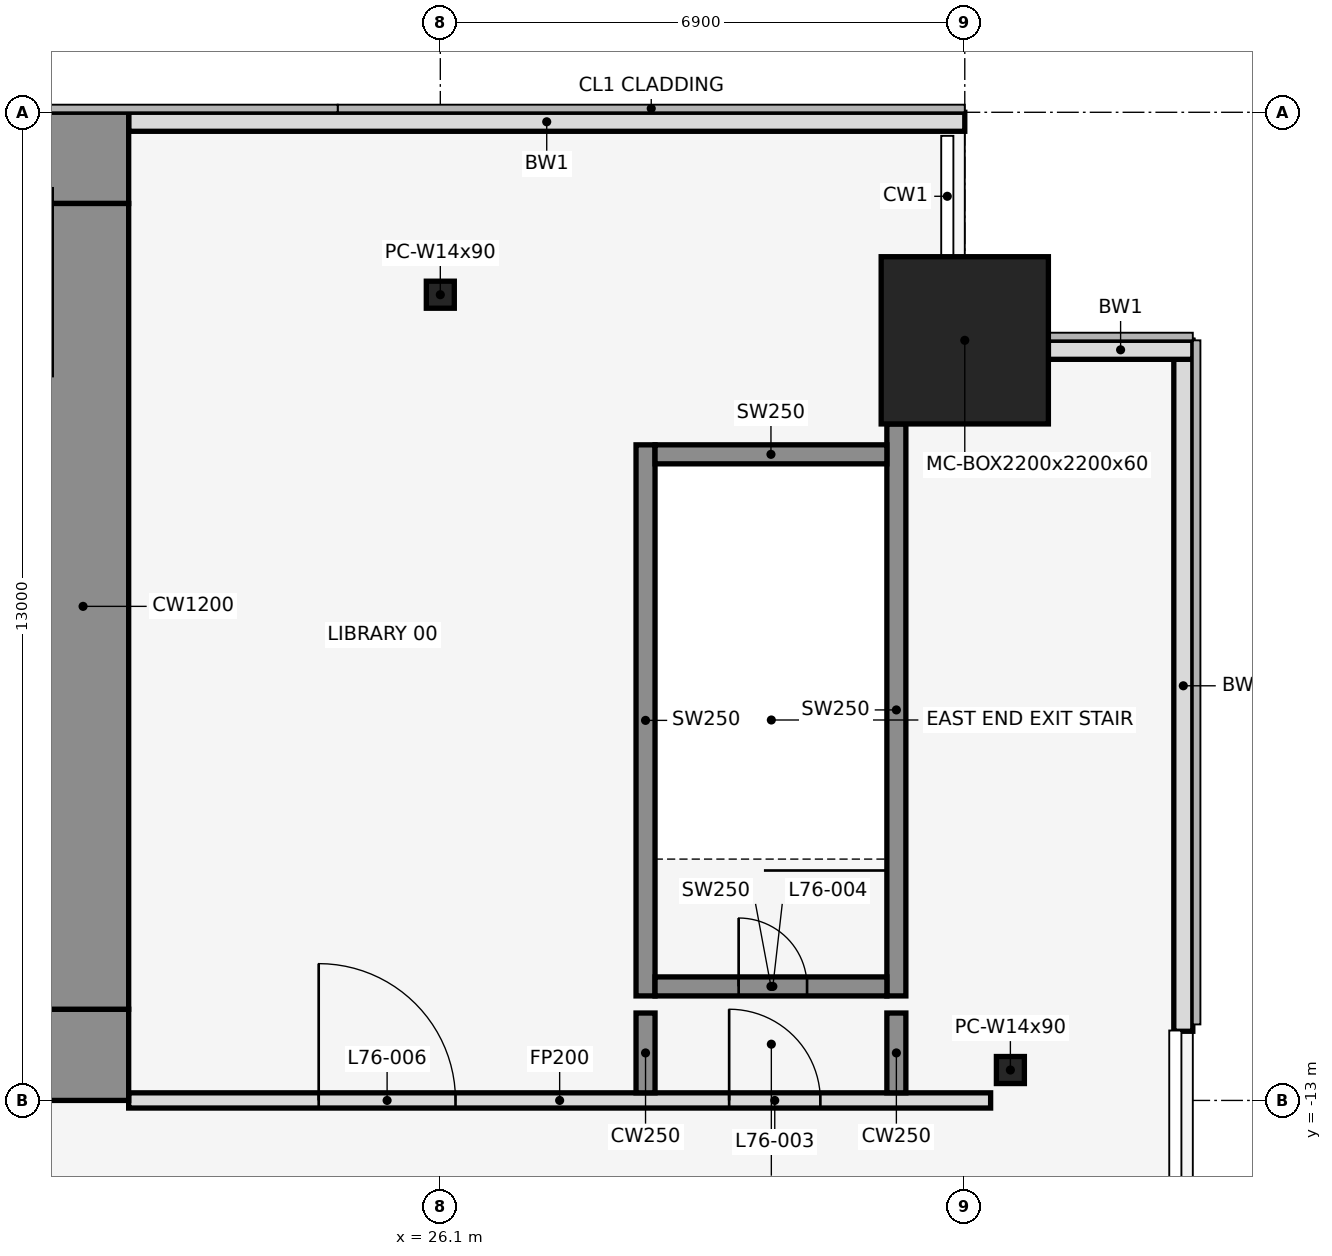
"""IFC4 building model, lengths in metres.
Left out: names, types, materials, properties, quantities, classifications, styles, units other than length and angle.
Written with IfcOpenShell. Run it as: python <this file> out.ifc"""

import sys

from ifc_helpers import new_model, si_unit, direction, frame, frame_2d, origin, origin_2d, place, context, subcontext, project, spatial, rectangle, hollow_rectangle, i_section, extrude, element, fill, save


model = new_model("IFC4")
c1 = context("Model", 3, precision=1e-05, world=origin(), true_north=direction((0.0, 1.0)))
c2 = subcontext(c1, "Body", "Model", "MODEL_VIEW")
j1 = project(units=[si_unit("LENGTHUNIT", "METRE"), si_unit("PLANEANGLEUNIT", "RADIAN")], contexts=[c1])
p1 = place(None, origin())
s1 = spatial("IfcSite", under=j1, at=p1, CompositionType="ELEMENT")
p2 = place(p1, origin())
s2 = spatial("IfcBuilding", under=s1, at=p2, CompositionType="ELEMENT")
p3 = place(p2, frame((0.0, 0.0, 338.0)))
s3 = spatial("IfcBuildingStorey", under=s2, at=p3, CompositionType="ELEMENT", Elevation=338.0)
p4 = place(p3, frame((26.1, -2.4, 0.0), z_axis=(0.0, 0.0, 1.0), x_axis=(1.0, 0.0, 0.0)))
e1 = element("IfcColumn", 1, at=p4, inside=s3, PredefinedType="COLUMN", context=c2, shape_type="SweptSolid", body=[
    extrude(i_section(OverallWidth=0.368, OverallDepth=0.356, WebThickness=0.011, FlangeThickness=0.018, at=origin_2d()), origin(), (0.0, 0.0, 1.0), 4.5),
])
p5 = place(p3, frame((33.0, -3.0, 0.0), z_axis=(0.0, 0.0, 1.0), x_axis=(1.0, 0.0, 0.0)))
e2 = element("IfcColumn", 2, at=p5, inside=s3, PredefinedType="COLUMN", context=c2, shape_type="SweptSolid", body=[
    extrude(hollow_rectangle(XDim=2.2, YDim=2.2, WallThickness=0.06, at=origin_2d()), origin(), (0.0, 0.0, 1.0), 4.5),
])
p6 = place(p3, frame((33.6, -12.6, 0.0), z_axis=(0.0, 0.0, 1.0), x_axis=(1.0, 0.0, 0.0)))
e3 = element("IfcColumn", 3, at=p6, inside=s3, PredefinedType="COLUMN", context=c2, shape_type="SweptSolid", body=[
    extrude(i_section(OverallWidth=0.368, OverallDepth=0.356, WebThickness=0.011, FlangeThickness=0.018, at=origin_2d()), origin(), (0.0, 0.0, 1.0), 4.5),
])
p7 = place(p3, frame((33.0, -0.125, 0.0), z_axis=(0.0, 0.0, 1.0), x_axis=(-1.0, 0.0, 0.0)))
e4 = element("IfcWall", 4, at=p7, inside=s3, PredefinedType="STANDARD", context=c2, shape_type="SweptSolid", body=[
    extrude(rectangle(XDim=11.0, YDim=0.25, at=frame_2d((5.5, 0.0))), origin(), (0.0, 0.0, 1.0), 4.3),
])
p8 = place(p3, frame((35.875, -12.09, 0.0), z_axis=(0.0, 0.0, 1.0), x_axis=(0.0, 1.0, 0.0)))
e5 = element("IfcWall", 5, at=p8, inside=s3, PredefinedType="STANDARD", context=c2, shape_type="SweptSolid", body=[
    extrude(rectangle(XDim=9.09, YDim=0.25, at=frame_2d((4.545, 0.0))), origin(), (0.0, 0.0, 1.0), 4.3),
])
p9 = place(p3, frame((36.0, -3.125, 0.0), z_axis=(0.0, 0.0, 1.0), x_axis=(-1.0, 0.0, 0.0)))
e6 = element("IfcWall", 6, at=p9, inside=s3, PredefinedType="STANDARD", context=c2, shape_type="SweptSolid", body=[
    extrude(rectangle(XDim=1.9, YDim=0.25, at=frame_2d((0.95, 0.0))), origin(), (0.0, 0.0, 1.0), 4.3),
])
p10 = place(p3, frame((28.8, -11.625, 0.0), z_axis=(0.0, 0.0, 1.0), x_axis=(0.0, 1.0, 0.0)))
e7 = element("IfcWall", 7, at=p10, inside=s3, PredefinedType="SHEAR", context=c2, shape_type="SweptSolid", body=[
    extrude(rectangle(XDim=7.25, YDim=0.25, at=frame_2d((3.625, 0.0))), origin(), (0.0, 0.0, 1.0), 4.5),
])
p11 = place(p3, frame((32.1, -11.625, 0.0), z_axis=(0.0, 0.0, 1.0), x_axis=(0.0, 1.0, 0.0)))
e8 = element("IfcWall", 8, at=p11, inside=s3, PredefinedType="SHEAR", context=c2, shape_type="SweptSolid", body=[
    extrude(rectangle(XDim=7.525, YDim=0.25, at=frame_2d((3.762, 0.0))), origin(), (0.0, 0.0, 1.0), 4.5),
])
p12 = place(p3, frame((28.925, -11.5, 0.0), z_axis=(0.0, 0.0, 1.0), x_axis=(1.0, 0.0, 0.0)))
e9 = element("IfcWall", 9, at=p12, inside=s3, PredefinedType="SHEAR", context=c2, shape_type="SweptSolid", body=[
    extrude(rectangle(XDim=3.05, YDim=0.25, at=frame_2d((1.525, 0.0))), origin(), (0.0, 0.0, 1.0), 4.5),
])
p13 = place(p12, frame((1.1, 0.0, 0.0)))
e10 = element("IfcOpeningElement", 10, at=p13, cuts=e9, PredefinedType="OPENING", context=c2, shape_type="SweptSolid", body=[
    extrude(rectangle(XDim=0.9, YDim=2.1, at=frame_2d((0.45, 1.05))), frame((0.0, 0.137, 0.0), z_axis=(0.0, -1.0, 0.0), x_axis=(1.0, 0.0, 0.0)), (0.0, 0.0, 1.0), 0.274),
])
p14 = place(p3, frame((28.925, -4.5, 0.0), z_axis=(0.0, 0.0, 1.0), x_axis=(1.0, 0.0, 0.0)))
e11 = element("IfcWall", 11, at=p14, inside=s3, PredefinedType="SHEAR", context=c2, shape_type="SweptSolid", body=[
    extrude(rectangle(XDim=3.05, YDim=0.25, at=frame_2d((1.525, 0.0))), origin(), (0.0, 0.0, 1.0), 4.5),
])
p15 = place(p3, frame((22.0, -13.0, 0.0), z_axis=(0.0, 0.0, 1.0), x_axis=(1.0, 0.0, 0.0)))
e12 = element("IfcWall", 12, at=p15, inside=s3, PredefinedType="PARTITIONING", context=c2, shape_type="SweptSolid", body=[
    extrude(rectangle(XDim=11.34, YDim=0.2, at=frame_2d((5.67, 0.0))), origin(), (0.0, 0.0, 1.0), 3.368),
])
p16 = place(p15, frame((7.9, 0.0, 0.0)))
e13 = element("IfcOpeningElement", 13, at=p16, cuts=e12, PredefinedType="OPENING", context=c2, shape_type="SweptSolid", body=[
    extrude(rectangle(XDim=1.2, YDim=2.1, at=frame_2d((0.6, 1.05))), frame((0.0, 0.112, 0.0), z_axis=(0.0, -1.0, 0.0), x_axis=(1.0, 0.0, 0.0)), (0.0, 0.0, 1.0), 0.224),
])
p17 = place(p15, frame((2.5, 0.0, 0.0)))
e14 = element("IfcOpeningElement", 14, at=p17, cuts=e12, PredefinedType="OPENING", context=c2, shape_type="SweptSolid", body=[
    extrude(rectangle(XDim=1.8, YDim=2.1, at=frame_2d((0.9, 1.05))), frame((0.0, 0.112, 0.0), z_axis=(0.0, -1.0, 0.0), x_axis=(1.0, 0.0, 0.0)), (0.0, 0.0, 1.0), 0.224),
])
for number, where, z_axis, x_axis in (
    (15, (28.8, -12.9, 0.0), (0.0, 0.0, 1.0), (0.0, 1.0, 0.0)),
    (16, (32.1, -12.9, 0.0), (0.0, 0.0, 1.0), (0.0, 1.0, 0.0)),
):
    element("IfcWall", number, at=place(p3, frame(where, z_axis=z_axis, x_axis=x_axis)), inside=s3, PredefinedType="SHEAR", context=c2, shape_type="SweptSolid", body=[
        extrude(rectangle(XDim=1.05, YDim=0.25, at=frame_2d((0.525, 0.0))), origin(), (0.0, 0.0, 1.0), 4.5),
    ])
p18 = place(p3, frame((-22.0, -0.6, 0.0), z_axis=(0.0, 0.0, 1.0), x_axis=(1.0, 0.0, 0.0)))
e17 = element("IfcWall", 17, at=p18, inside=s3, PredefinedType="SHEAR", context=c2, shape_type="SweptSolid", body=[
    extrude(rectangle(XDim=44.0, YDim=1.2, at=frame_2d((22.0, 0.0))), origin(), (0.0, 0.0, 1.0), 4.5),
])
p19 = place(p18, frame((18.55, 0.0, 0.0)))
e18 = element("IfcOpeningElement", 18, at=p19, cuts=e17, PredefinedType="OPENING", context=c2, shape_type="SweptSolid", body=[
    extrude(rectangle(XDim=0.9, YDim=2.1, at=frame_2d((0.45, 1.05))), frame((0.0, 0.612, 0.0), z_axis=(0.0, -1.0, 0.0), x_axis=(1.0, 0.0, 0.0)), (0.0, 0.0, 1.0), 1.224),
])
p20 = place(p18, frame((24.55, 0.0, 0.0)))
e19 = element("IfcOpeningElement", 19, at=p20, cuts=e17, PredefinedType="OPENING", context=c2, shape_type="SweptSolid", body=[
    extrude(rectangle(XDim=0.9, YDim=2.1, at=frame_2d((0.45, 1.05))), frame((0.0, 0.612, 0.0), z_axis=(0.0, -1.0, 0.0), x_axis=(1.0, 0.0, 0.0)), (0.0, 0.0, 1.0), 1.224),
])
p21 = place(p3, frame((-22.0, -12.4, 0.0), z_axis=(0.0, 0.0, 1.0), x_axis=(1.0, 0.0, 0.0)))
e20 = element("IfcWall", 20, at=p21, inside=s3, PredefinedType="SHEAR", context=c2, shape_type="SweptSolid", body=[
    extrude(rectangle(XDim=44.0, YDim=1.2, at=frame_2d((22.0, 0.0))), origin(), (0.0, 0.0, 1.0), 4.5),
])
p22 = place(p21, frame((2.2, 0.0, 0.0)))
e21 = element("IfcOpeningElement", 21, at=p22, cuts=e20, PredefinedType="OPENING", context=c2, shape_type="SweptSolid", body=[
    extrude(rectangle(XDim=1.2, YDim=2.1, at=frame_2d((0.6, 1.05))), frame((0.0, 0.612, 0.0), z_axis=(0.0, -1.0, 0.0), x_axis=(1.0, 0.0, 0.0)), (0.0, 0.0, 1.0), 1.224),
])
p23 = place(p21, frame((21.4, 0.0, 0.0)))
e22 = element("IfcOpeningElement", 22, at=p23, cuts=e20, PredefinedType="OPENING", context=c2, shape_type="SweptSolid", body=[
    extrude(rectangle(XDim=1.2, YDim=2.1, at=frame_2d((0.6, 1.05))), frame((0.0, 0.612, 0.0), z_axis=(0.0, -1.0, 0.0), x_axis=(1.0, 0.0, 0.0)), (0.0, 0.0, 1.0), 1.224),
])
p24 = place(p21, frame((40.6, 0.0, 0.0)))
e23 = element("IfcOpeningElement", 23, at=p24, cuts=e20, PredefinedType="OPENING", context=c2, shape_type="SweptSolid", body=[
    extrude(rectangle(XDim=1.2, YDim=2.1, at=frame_2d((0.6, 1.05))), frame((0.0, 0.612, 0.0), z_axis=(0.0, -1.0, 0.0), x_axis=(1.0, 0.0, 0.0)), (0.0, 0.0, 1.0), 1.224),
])
p25 = place(p21, frame((16.0, 0.0, 0.0)))
e24 = element("IfcOpeningElement", 24, at=p25, cuts=e20, PredefinedType="OPENING", context=c2, shape_type="SweptSolid", body=[
    extrude(rectangle(XDim=1.8, YDim=2.1, at=frame_2d((0.9, 1.05))), frame((0.0, 0.612, 0.0), z_axis=(0.0, -1.0, 0.0), x_axis=(1.0, 0.0, 0.0)), (0.0, 0.0, 1.0), 1.224),
])
p26 = place(p21, frame((6.3, 0.0, 0.0)))
e25 = element("IfcOpeningElement", 25, at=p26, cuts=e20, PredefinedType="OPENING", context=c2, shape_type="SweptSolid", body=[
    extrude(rectangle(XDim=1.2, YDim=2.1, at=frame_2d((0.6, 1.05))), frame((0.0, 0.612, 0.0), z_axis=(0.0, -1.0, 0.0), x_axis=(1.0, 0.0, 0.0)), (0.0, 0.0, 1.0), 1.224),
])
p27 = place(p21, frame((26.2, 0.0, 0.0)))
e26 = element("IfcOpeningElement", 26, at=p27, cuts=e20, PredefinedType="OPENING", context=c2, shape_type="SweptSolid", body=[
    extrude(rectangle(XDim=1.8, YDim=2.1, at=frame_2d((0.9, 1.05))), frame((0.0, 0.612, 0.0), z_axis=(0.0, -1.0, 0.0), x_axis=(1.0, 0.0, 0.0)), (0.0, 0.0, 1.0), 1.224),
])
p28 = place(p21, frame((36.5, 0.0, 0.0)))
e27 = element("IfcOpeningElement", 27, at=p28, cuts=e20, PredefinedType="OPENING", context=c2, shape_type="SweptSolid", body=[
    extrude(rectangle(XDim=1.2, YDim=2.1, at=frame_2d((0.6, 1.05))), frame((0.0, 0.612, 0.0), z_axis=(0.0, -1.0, 0.0), x_axis=(1.0, 0.0, 0.0)), (0.0, 0.0, 1.0), 1.224),
])
p29 = place(p3, frame((21.4, -11.8, 0.0), z_axis=(0.0, 0.0, 1.0), x_axis=(0.0, 1.0, 0.0)))
e28 = element("IfcWall", 28, at=p29, inside=s3, PredefinedType="SHEAR", context=c2, shape_type="SweptSolid", body=[
    extrude(rectangle(XDim=10.6, YDim=1.2, at=frame_2d((5.3, 0.0))), origin(), (0.0, 0.0, 1.0), 4.5),
])
p30 = place(p16, origin())
e29 = element("IfcDoor", 29, at=p30, inside=s3, OperationType="SINGLE_SWING_RIGHT", PredefinedType="DOOR", context=c2, shape_type="SweptSolid", body=[
    extrude(rectangle(XDim=1.2, YDim=2.1, at=frame_2d((0.6, 1.05))), frame((0.0, 0.025, 0.0), z_axis=(0.0, -1.0, 0.0), x_axis=(1.0, 0.0, 0.0)), (0.0, 0.0, 1.0), 0.05),
])
fill(e13, e29)
p31 = place(p13, origin())
e30 = element("IfcDoor", 30, at=p31, inside=s3, OperationType="SINGLE_SWING_LEFT", PredefinedType="DOOR", context=c2, shape_type="SweptSolid", body=[
    extrude(rectangle(XDim=0.9, YDim=2.1, at=frame_2d((0.45, 1.05))), frame((0.0, 0.025, 0.0), z_axis=(0.0, -1.0, 0.0), x_axis=(1.0, 0.0, 0.0)), (0.0, 0.0, 1.0), 0.05),
])
fill(e10, e30)
p32 = place(p17, origin())
e31 = element("IfcDoor", 31, at=p32, inside=s3, OperationType="SINGLE_SWING_LEFT", PredefinedType="DOOR", context=c2, shape_type="SweptSolid", body=[
    extrude(rectangle(XDim=1.8, YDim=2.1, at=frame_2d((0.9, 1.05))), frame((0.0, 0.025, 0.0), z_axis=(0.0, -1.0, 0.0), x_axis=(1.0, 0.0, 0.0)), (0.0, 0.0, 1.0), 0.05),
])
fill(e14, e31)
save(model, sys.argv[1])
